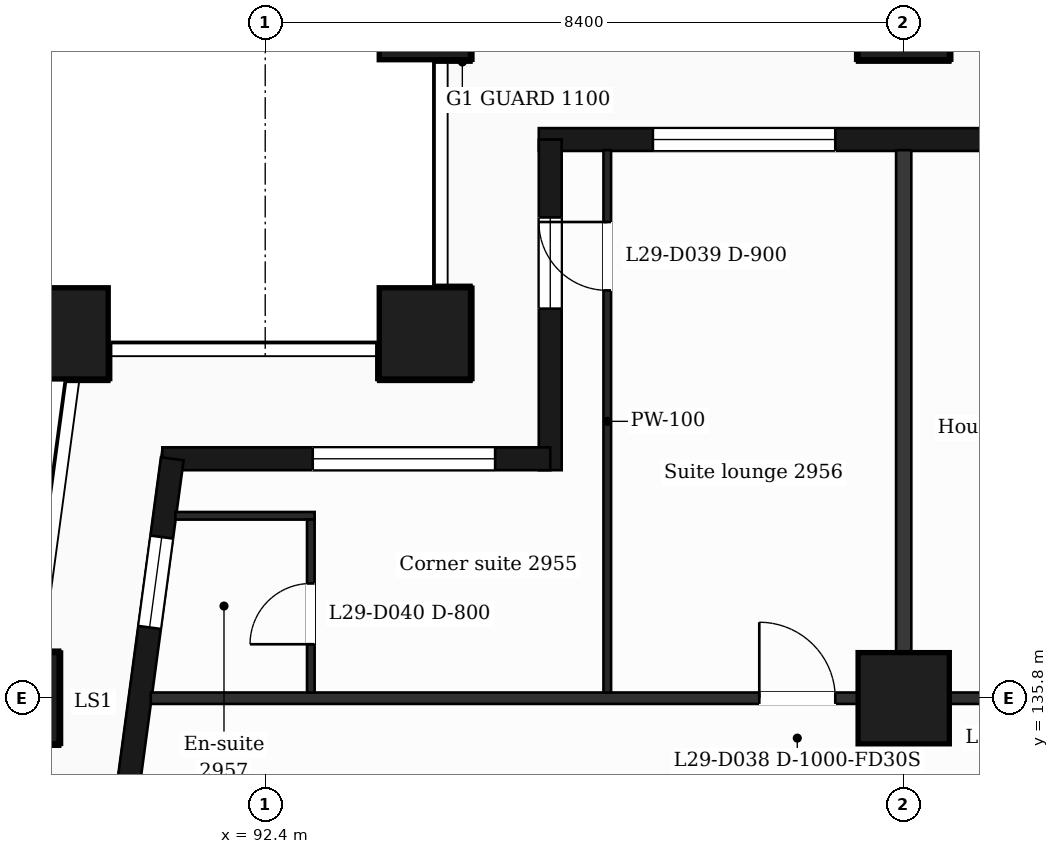
"""IFC4 building model, lengths in metres.
Left out: names, types, materials, properties, quantities, classifications, styles, units other than length and angle.
Written with IfcOpenShell. Run it as: python <this file> out.ifc"""

import sys

from ifc_helpers import new_model, si_unit, direction, frame, frame_2d, origin, origin_2d, place, context, subcontext, project, spatial, rectangle, extrude, element, fill, save


model = new_model("IFC4")
c1 = context("Model", 3, precision=1e-05, world=origin(), true_north=direction((0.0, 1.0)))
c2 = subcontext(c1, "Body", "Model", "MODEL_VIEW")
j1 = project(units=[si_unit("LENGTHUNIT", "METRE"), si_unit("PLANEANGLEUNIT", "RADIAN")], contexts=[c1])
p1 = place(None, origin())
s1 = spatial("IfcSite", under=j1, at=p1, CompositionType="ELEMENT")
p2 = place(p1, origin())
s2 = spatial("IfcBuilding", under=s1, at=p2, CompositionType="ELEMENT")
p3 = place(p2, frame((0.0, 0.0, 124.3)))
s3 = spatial("IfcBuildingStorey", under=s2, at=p3, CompositionType="ELEMENT", Elevation=124.3)
for number, where, z_axis, x_axis in (
    (1, (94.5, 140.6, 0.0), (0.0, 0.0, 1.0), (1.0, 0.0, 0.0)),
    (2, (89.735, 140.6, 0.0), (0.0, 0.0, 1.0), (1.0, 0.0, 0.0)),
    (3, (100.8, 135.8, 0.0), (0.0, 0.0, 1.0), (1.0, 0.0, 0.0)),
    (4, (89.088, 135.8, 0.0), (0.0, 0.0, 1.0), (1.0, 0.0, 0.0)),
    (5, (100.8, 144.8, 0.0), (0.0, 0.0, 1.0), (1.0, 0.0, 0.0)),
    (6, (94.5, 144.8, 0.0), (0.0, 0.0, 1.0), (1.0, 0.0, 0.0)),
):
    element("IfcColumn", number, at=place(p3, frame(where, z_axis=z_axis, x_axis=x_axis)), inside=s3, PredefinedType="COLUMN", context=c2, shape_type="SweptSolid", body=[
        extrude(rectangle(XDim=1.2, YDim=1.2, at=origin_2d()), origin(), (0.0, 0.0, 1.0), 3.7),
    ])
p4 = place(p3, frame((112.5, 143.15, 0.0), z_axis=(0.0, 0.0, 1.0), x_axis=(-1.0, 0.0, 0.0)))
e7 = element("IfcWall", 7, at=p4, inside=s3, PredefinedType="SOLIDWALL", context=c2, shape_type="SweptSolid", body=[
    extrude(rectangle(XDim=16.5, YDim=0.3, at=frame_2d((8.25, 0.0))), origin(), (0.0, 0.0, 1.0), 3.38),
])
p5 = place(p4, frame((0.5, 0.0, 0.9)))
e8 = element("IfcOpeningElement", 8, at=p5, cuts=e7, PredefinedType="OPENING", context=c2, shape_type="SweptSolid", body=[
    extrude(rectangle(XDim=2.4, YDim=2.1, at=frame_2d((1.2, 1.05))), frame((0.0, 0.16, 0.0), z_axis=(0.0, -1.0, 0.0), x_axis=(1.0, 0.0, 0.0)), (0.0, 0.0, 1.0), 0.32),
])
p6 = place(p4, frame((4.2, 0.0, 0.9)))
e9 = element("IfcOpeningElement", 9, at=p6, cuts=e7, PredefinedType="OPENING", context=c2, shape_type="SweptSolid", body=[
    extrude(rectangle(XDim=2.4, YDim=2.1, at=frame_2d((1.2, 1.05))), frame((0.0, 0.16, 0.0), z_axis=(0.0, -1.0, 0.0), x_axis=(1.0, 0.0, 0.0)), (0.0, 0.0, 1.0), 0.32),
])
p7 = place(p4, frame((9.0, 0.0, 0.0)))
e10 = element("IfcOpeningElement", 10, at=p7, cuts=e7, PredefinedType="OPENING", context=c2, shape_type="SweptSolid", body=[
    extrude(rectangle(XDim=1.2, YDim=2.4, at=frame_2d((0.6, 1.2))), frame((0.0, 0.16, 0.0), z_axis=(0.0, -1.0, 0.0), x_axis=(1.0, 0.0, 0.0)), (0.0, 0.0, 1.0), 0.32),
])
p8 = place(p4, frame((12.6, 0.0, 0.9)))
e11 = element("IfcOpeningElement", 11, at=p8, cuts=e7, PredefinedType="OPENING", context=c2, shape_type="SweptSolid", body=[
    extrude(rectangle(XDim=2.4, YDim=2.1, at=frame_2d((1.2, 1.05))), frame((0.0, 0.16, 0.0), z_axis=(0.0, -1.0, 0.0), x_axis=(1.0, 0.0, 0.0)), (0.0, 0.0, 1.0), 0.32),
])
p9 = place(p3, frame((96.15, 143.15, 0.0), z_axis=(0.0, 0.0, 1.0), x_axis=(0.0, -1.0, 0.0)))
e12 = element("IfcWall", 12, at=p9, inside=s3, PredefinedType="SOLIDWALL", context=c2, shape_type="SweptSolid", body=[
    extrude(rectangle(XDim=4.35, YDim=0.3, at=frame_2d((2.175, 0.0))), origin(), (0.0, 0.0, 1.0), 3.38),
])
p10 = place(p9, frame((1.025, 0.0, 0.9)))
e13 = element("IfcOpeningElement", 13, at=p10, cuts=e12, PredefinedType="OPENING", context=c2, shape_type="SweptSolid", body=[
    extrude(rectangle(XDim=1.2, YDim=2.1, at=frame_2d((0.6, 1.05))), frame((0.0, 0.16, 0.0), z_axis=(0.0, -1.0, 0.0), x_axis=(1.0, 0.0, 0.0)), (0.0, 0.0, 1.0), 0.32),
])
p11 = place(p3, frame((96.15, 138.95, 0.0), z_axis=(0.0, 0.0, 1.0), x_axis=(-1.0, 0.0, 0.0)))
e14 = element("IfcWall", 14, at=p11, inside=s3, PredefinedType="SOLIDWALL", context=c2, shape_type="SweptSolid", body=[
    extrude(rectangle(XDim=5.104, YDim=0.3, at=frame_2d((2.552, 0.0))), origin(), (0.0, 0.0, 1.0), 3.38),
])
p12 = place(p11, frame((0.725, 0.0, 0.9)))
e15 = element("IfcOpeningElement", 15, at=p12, cuts=e14, PredefinedType="OPENING", context=c2, shape_type="SweptSolid", body=[
    extrude(rectangle(XDim=2.4, YDim=2.1, at=frame_2d((1.2, 1.05))), frame((0.0, 0.16, 0.0), z_axis=(0.0, -1.0, 0.0), x_axis=(1.0, 0.0, 0.0)), (0.0, 0.0, 1.0), 0.32),
])
p13 = place(p3, frame((91.177, 138.95, 0.0), z_axis=(0.0, 0.0, 1.0), x_axis=(-0.133426664613, -0.991058689065, 0.0)))
e16 = element("IfcWall", 16, at=p13, inside=s3, PredefinedType="SOLIDWALL", context=c2, shape_type="SweptSolid", body=[
    extrude(rectangle(XDim=6.609, YDim=0.3, at=frame_2d((3.305, 0.0))), origin(), (0.0, 0.0, 1.0), 3.38),
])
p14 = place(p13, frame((1.039, 0.0, 0.9)))
e17 = element("IfcOpeningElement", 17, at=p14, cuts=e16, PredefinedType="OPENING", context=c2, shape_type="SweptSolid", body=[
    extrude(rectangle(XDim=1.2, YDim=2.1, at=frame_2d((0.6, 1.05))), frame((0.0, 0.16, 0.0), z_axis=(0.0, -1.0, 0.0), x_axis=(1.0, 0.0, 0.0)), (0.0, 0.0, 1.0), 0.32),
])
p15 = place(p13, frame((4.294, 0.0, 0.0)))
e18 = element("IfcOpeningElement", 18, at=p15, cuts=e16, PredefinedType="OPENING", context=c2, shape_type="SweptSolid", body=[
    extrude(rectangle(XDim=1.2, YDim=2.4, at=frame_2d((0.6, 1.2))), frame((0.0, 0.16, 0.0), z_axis=(0.0, -1.0, 0.0), x_axis=(1.0, 0.0, 0.0)), (0.0, 0.0, 1.0), 0.32),
])
p16 = place(p3, frame((90.895, 135.8, 0.0), z_axis=(0.0, 0.0, 1.0), x_axis=(1.0, 0.0, 0.0)))
e19 = element("IfcWall", 19, at=p16, inside=s3, PredefinedType="PARTITIONING", context=c2, shape_type="SweptSolid", body=[
    extrude(rectangle(XDim=45.011, YDim=0.15, at=frame_2d((22.505, 0.0))), origin(), (0.0, 0.0, 1.0), 3.38),
])
p17 = place(p16, frame((8.005, 0.0, 0.0)))
e20 = element("IfcOpeningElement", 20, at=p17, cuts=e19, PredefinedType="OPENING", context=c2, shape_type="SweptSolid", body=[
    extrude(rectangle(XDim=1.0, YDim=2.1, at=frame_2d((0.5, 1.05))), frame((0.0, 0.085, 0.0), z_axis=(0.0, -1.0, 0.0), x_axis=(1.0, 0.0, 0.0)), (0.0, 0.0, 1.0), 0.17),
])
p18 = place(p16, frame((11.785, 0.0, 0.0)))
e21 = element("IfcOpeningElement", 21, at=p18, cuts=e19, PredefinedType="OPENING", context=c2, shape_type="SweptSolid", body=[
    extrude(rectangle(XDim=0.95, YDim=2.1, at=frame_2d((0.475, 1.05))), frame((0.0, 0.085, 0.0), z_axis=(0.0, -1.0, 0.0), x_axis=(1.0, 0.0, 0.0)), (0.0, 0.0, 1.0), 0.17),
])
p19 = place(p16, frame((14.38, 0.0, 0.0)))
e22 = element("IfcOpeningElement", 22, at=p19, cuts=e19, PredefinedType="OPENING", context=c2, shape_type="SweptSolid", body=[
    extrude(rectangle(XDim=0.95, YDim=2.1, at=frame_2d((0.475, 1.05))), frame((0.0, 0.085, 0.0), z_axis=(0.0, -1.0, 0.0), x_axis=(1.0, 0.0, 0.0)), (0.0, 0.0, 1.0), 0.17),
])
p20 = place(p16, frame((19.075, 0.0, 0.0)))
e23 = element("IfcOpeningElement", 23, at=p20, cuts=e19, PredefinedType="OPENING", context=c2, shape_type="SweptSolid", body=[
    extrude(rectangle(XDim=0.95, YDim=2.1, at=frame_2d((0.475, 1.05))), frame((0.0, 0.085, 0.0), z_axis=(0.0, -1.0, 0.0), x_axis=(1.0, 0.0, 0.0)), (0.0, 0.0, 1.0), 0.17),
])
p21 = place(p16, frame((24.855, 0.0, 0.0)))
e24 = element("IfcOpeningElement", 24, at=p21, cuts=e19, PredefinedType="OPENING", context=c2, shape_type="SweptSolid", body=[
    extrude(rectangle(XDim=1.0, YDim=2.1, at=frame_2d((0.5, 1.05))), frame((0.0, 0.085, 0.0), z_axis=(0.0, -1.0, 0.0), x_axis=(1.0, 0.0, 0.0)), (0.0, 0.0, 1.0), 0.17),
])
p22 = place(p16, frame((27.515, 0.0, 0.0)))
e25 = element("IfcOpeningElement", 25, at=p22, cuts=e19, PredefinedType="OPENING", context=c2, shape_type="SweptSolid", body=[
    extrude(rectangle(XDim=0.95, YDim=2.1, at=frame_2d((0.475, 1.05))), frame((0.0, 0.085, 0.0), z_axis=(0.0, -1.0, 0.0), x_axis=(1.0, 0.0, 0.0)), (0.0, 0.0, 1.0), 0.17),
])
p23 = place(p16, frame((33.242, 0.0, 0.0)))
e26 = element("IfcOpeningElement", 26, at=p23, cuts=e19, PredefinedType="OPENING", context=c2, shape_type="SweptSolid", body=[
    extrude(rectangle(XDim=0.95, YDim=2.1, at=frame_2d((0.475, 1.05))), frame((0.0, 0.085, 0.0), z_axis=(0.0, -1.0, 0.0), x_axis=(1.0, 0.0, 0.0)), (0.0, 0.0, 1.0), 0.17),
])
p24 = place(p16, frame((37.105, 0.0, 0.0)))
e27 = element("IfcOpeningElement", 27, at=p24, cuts=e19, PredefinedType="OPENING", context=c2, shape_type="SweptSolid", body=[
    extrude(rectangle(XDim=1.0, YDim=2.1, at=frame_2d((0.5, 1.05))), frame((0.0, 0.085, 0.0), z_axis=(0.0, -1.0, 0.0), x_axis=(1.0, 0.0, 0.0)), (0.0, 0.0, 1.0), 0.17),
])
p25 = place(p3, frame((91.218, 138.2, 0.0), z_axis=(0.0, 0.0, 1.0), x_axis=(1.0, 0.0, 0.0)))
e28 = element("IfcWall", 28, at=p25, inside=s3, PredefinedType="PARTITIONING", context=c2, shape_type="SweptSolid", body=[
    extrude(rectangle(XDim=1.832, YDim=0.1, at=frame_2d((0.916, 0.0))), origin(), (0.0, 0.0, 1.0), 3.38),
])
p26 = place(p3, frame((93.0, 135.875, 0.0), z_axis=(0.0, 0.0, 1.0), x_axis=(0.0, 1.0, 0.0)))
e29 = element("IfcWall", 29, at=p26, inside=s3, PredefinedType="PARTITIONING", context=c2, shape_type="SweptSolid", body=[
    extrude(rectangle(XDim=2.275, YDim=0.1, at=frame_2d((1.137, 0.0))), origin(), (0.0, 0.0, 1.0), 3.38),
])
p27 = place(p26, frame((0.635, 0.0, 0.0)))
e30 = element("IfcOpeningElement", 30, at=p27, cuts=e29, PredefinedType="OPENING", context=c2, shape_type="SweptSolid", body=[
    extrude(rectangle(XDim=0.8, YDim=2.1, at=frame_2d((0.4, 1.05))), frame((0.0, 0.06, 0.0), z_axis=(0.0, -1.0, 0.0), x_axis=(1.0, 0.0, 0.0)), (0.0, 0.0, 1.0), 0.12),
])
p28 = place(p3, frame((96.9, 135.875, 0.0), z_axis=(0.0, 0.0, 1.0), x_axis=(0.0, 1.0, 0.0)))
e31 = element("IfcWall", 31, at=p28, inside=s3, PredefinedType="PARTITIONING", context=c2, shape_type="SweptSolid", body=[
    extrude(rectangle(XDim=7.135, YDim=0.1, at=frame_2d((3.567, 0.0))), origin(), (0.0, 0.0, 1.0), 3.38),
])
p29 = place(p28, frame((5.29, 0.0, 0.0)))
e32 = element("IfcOpeningElement", 32, at=p29, cuts=e31, PredefinedType="OPENING", context=c2, shape_type="SweptSolid", body=[
    extrude(rectangle(XDim=0.9, YDim=2.1, at=frame_2d((0.45, 1.05))), frame((0.0, 0.06, 0.0), z_axis=(0.0, -1.0, 0.0), x_axis=(1.0, 0.0, 0.0)), (0.0, 0.0, 1.0), 0.12),
])
p30 = place(p3, frame((100.8, 135.875, 0.0), z_axis=(0.0, 0.0, 1.0), x_axis=(0.0, 1.0, 0.0)))
e33 = element("IfcWall", 33, at=p30, inside=s3, PredefinedType="PARTITIONING", context=c2, shape_type="SweptSolid", body=[
    extrude(rectangle(XDim=7.135, YDim=0.2, at=frame_2d((3.567, 0.0))), origin(), (0.0, 0.0, 1.0), 3.38),
])
p31 = place(p8, origin())
e34 = element("IfcWindow", 34, at=p31, inside=s3, PartitioningType="SINGLE_PANEL", PredefinedType="WINDOW", context=c2, shape_type="SweptSolid", body=[
    extrude(rectangle(XDim=2.4, YDim=2.1, at=frame_2d((1.2, 1.05))), frame((0.0, 0.03, 0.0), z_axis=(0.0, -1.0, 0.0), x_axis=(1.0, 0.0, 0.0)), (0.0, 0.0, 1.0), 0.06),
])
fill(e11, e34)
p32 = place(p10, origin())
e35 = element("IfcWindow", 35, at=p32, inside=s3, PartitioningType="SINGLE_PANEL", PredefinedType="WINDOW", context=c2, shape_type="SweptSolid", body=[
    extrude(rectangle(XDim=1.2, YDim=2.1, at=frame_2d((0.6, 1.05))), frame((0.0, 0.03, 0.0), z_axis=(0.0, -1.0, 0.0), x_axis=(1.0, 0.0, 0.0)), (0.0, 0.0, 1.0), 0.06),
])
fill(e13, e35)
p33 = place(p12, origin())
e36 = element("IfcWindow", 36, at=p33, inside=s3, PartitioningType="SINGLE_PANEL", PredefinedType="WINDOW", context=c2, shape_type="SweptSolid", body=[
    extrude(rectangle(XDim=2.4, YDim=2.1, at=frame_2d((1.2, 1.05))), frame((0.0, 0.03, 0.0), z_axis=(0.0, -1.0, 0.0), x_axis=(1.0, 0.0, 0.0)), (0.0, 0.0, 1.0), 0.06),
])
fill(e15, e36)
p34 = place(p14, origin())
e37 = element("IfcWindow", 37, at=p34, inside=s3, PartitioningType="SINGLE_PANEL", PredefinedType="WINDOW", context=c2, shape_type="SweptSolid", body=[
    extrude(rectangle(XDim=1.2, YDim=2.1, at=frame_2d((0.6, 1.05))), frame((0.0, 0.03, 0.0), z_axis=(0.0, -1.0, 0.0), x_axis=(1.0, 0.0, 0.0)), (0.0, 0.0, 1.0), 0.06),
])
fill(e17, e37)
p35 = place(p17, origin())
e38 = element("IfcDoor", 38, at=p35, inside=s3, OperationType="SINGLE_SWING_LEFT", PredefinedType="DOOR", context=c2, shape_type="SweptSolid", body=[
    extrude(rectangle(XDim=1.0, YDim=2.1, at=frame_2d((0.5, 1.05))), frame((0.0, 0.025, 0.0), z_axis=(0.0, -1.0, 0.0), x_axis=(1.0, 0.0, 0.0)), (0.0, 0.0, 1.0), 0.05),
])
fill(e20, e38)
p36 = place(p29, origin())
e39 = element("IfcDoor", 39, at=p36, inside=s3, OperationType="SINGLE_SWING_RIGHT", PredefinedType="DOOR", context=c2, shape_type="SweptSolid", body=[
    extrude(rectangle(XDim=0.9, YDim=2.1, at=frame_2d((0.45, 1.05))), frame((0.0, 0.025, 0.0), z_axis=(0.0, -1.0, 0.0), x_axis=(1.0, 0.0, 0.0)), (0.0, 0.0, 1.0), 0.05),
])
fill(e32, e39)
p37 = place(p27, origin())
e40 = element("IfcDoor", 40, at=p37, inside=s3, OperationType="SINGLE_SWING_LEFT", PredefinedType="DOOR", context=c2, shape_type="SweptSolid", body=[
    extrude(rectangle(XDim=0.8, YDim=2.1, at=frame_2d((0.4, 1.05))), frame((0.0, 0.025, 0.0), z_axis=(0.0, -1.0, 0.0), x_axis=(1.0, 0.0, 0.0)), (0.0, 0.0, 1.0), 0.05),
])
fill(e30, e40)
save(model, sys.argv[1])
